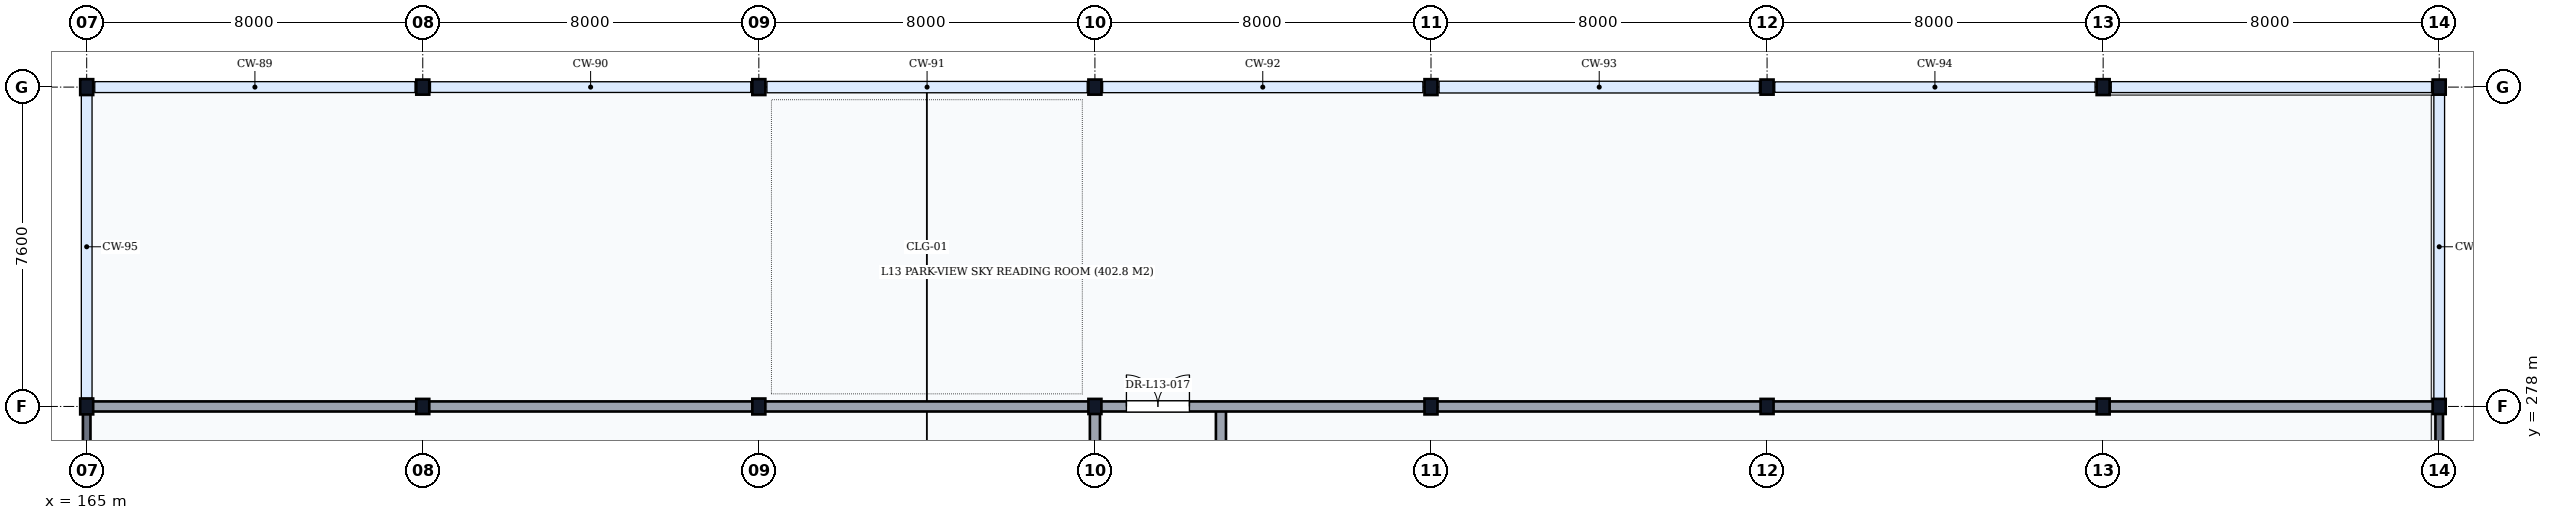
"""IFC4 building model, lengths in metres.
Left out: names, types, materials, properties, quantities, classifications, styles, units other than length and angle.
Written with IfcOpenShell. Run it as: python <this file> out.ifc"""

import sys

from ifc_helpers import new_model, si_unit, direction, frame, frame_2d, origin, origin_2d, place, context, subcontext, project, spatial, rectangle, i_section, extrude, element, fill, save


model = new_model("IFC4")
c1 = context("Model", 3, precision=1e-05, world=origin(), true_north=direction((0.0, 1.0)))
c2 = subcontext(c1, "Body", "Model", "MODEL_VIEW")
j1 = project(units=[si_unit("LENGTHUNIT", "METRE"), si_unit("PLANEANGLEUNIT", "RADIAN")], contexts=[c1])
p1 = place(None, origin())
s1 = spatial("IfcSite", under=j1, at=p1, CompositionType="ELEMENT")
p2 = place(p1, origin())
s2 = spatial("IfcBuilding", under=s1, at=p2, CompositionType="ELEMENT")
p3 = place(p2, frame((0.0, 0.0, 51.6)))
s3 = spatial("IfcBuildingStorey", under=s2, at=p3, CompositionType="ELEMENT", Elevation=51.6)
for number, where, z_axis, x_axis in (
    (1, (165.0, 278.0, 0.0), (0.0, 0.0, 1.0), (1.0, 0.0, 0.0)),
    (2, (165.0, 285.6, 0.0), (0.0, 0.0, 1.0), (1.0, 0.0, 0.0)),
):
    element("IfcColumn", number, at=place(p3, frame(where, z_axis=z_axis, x_axis=x_axis)), inside=s3, PredefinedType="COLUMN", context=c2, shape_type="SweptSolid", body=[
        extrude(i_section(OverallWidth=0.309, OverallDepth=0.377, WebThickness=0.021, FlangeThickness=0.04, FilletRadius=0.027, at=origin_2d()), origin(), (0.0, 0.0, 1.0), 4.5),
    ])
for number, where, z_axis, x_axis in (
    (3, (173.0, 278.0, 0.0), (0.0, 0.0, 1.0), (1.0, 0.0, 0.0)),
    (4, (173.0, 285.6, 0.0), (0.0, 0.0, 1.0), (1.0, 0.0, 0.0)),
):
    element("IfcColumn", number, at=place(p3, frame(where, z_axis=z_axis, x_axis=x_axis)), inside=s3, PredefinedType="COLUMN", context=c2, shape_type="SweptSolid", body=[
        extrude(i_section(OverallWidth=0.309, OverallDepth=0.359, WebThickness=0.021, FlangeThickness=0.04, FilletRadius=0.027, at=origin_2d()), origin(), (0.0, 0.0, 1.0), 4.5),
    ])
for number, where, z_axis, x_axis in (
    (5, (181.0, 278.0, 0.0), (0.0, 0.0, 1.0), (1.0, 0.0, 0.0)),
    (6, (181.0, 285.6, 0.0), (0.0, 0.0, 1.0), (1.0, 0.0, 0.0)),
):
    element("IfcColumn", number, at=place(p3, frame(where, z_axis=z_axis, x_axis=x_axis)), inside=s3, PredefinedType="COLUMN", context=c2, shape_type="SweptSolid", body=[
        extrude(i_section(OverallWidth=0.309, OverallDepth=0.377, WebThickness=0.021, FlangeThickness=0.04, FilletRadius=0.027, at=origin_2d()), origin(), (0.0, 0.0, 1.0), 4.5),
    ])
for number, where, z_axis, x_axis in (
    (7, (189.0, 278.0, 0.0), (0.0, 0.0, 1.0), (1.0, 0.0, 0.0)),
    (8, (189.0, 285.6, 0.0), (0.0, 0.0, 1.0), (1.0, 0.0, 0.0)),
):
    element("IfcColumn", number, at=place(p3, frame(where, z_axis=z_axis, x_axis=x_axis)), inside=s3, PredefinedType="COLUMN", context=c2, shape_type="SweptSolid", body=[
        extrude(i_section(OverallWidth=0.309, OverallDepth=0.359, WebThickness=0.021, FlangeThickness=0.04, FilletRadius=0.027, at=origin_2d()), origin(), (0.0, 0.0, 1.0), 4.5),
    ])
for number, where, z_axis, x_axis in (
    (9, (197.0, 278.0, 0.0), (0.0, 0.0, 1.0), (1.0, 0.0, 0.0)),
    (10, (197.0, 285.6, 0.0), (0.0, 0.0, 1.0), (1.0, 0.0, 0.0)),
):
    element("IfcColumn", number, at=place(p3, frame(where, z_axis=z_axis, x_axis=x_axis)), inside=s3, PredefinedType="COLUMN", context=c2, shape_type="SweptSolid", body=[
        extrude(i_section(OverallWidth=0.309, OverallDepth=0.377, WebThickness=0.021, FlangeThickness=0.04, FilletRadius=0.027, at=origin_2d()), origin(), (0.0, 0.0, 1.0), 4.5),
    ])
for number, where, z_axis, x_axis in (
    (11, (205.0, 278.0, 0.0), (0.0, 0.0, 1.0), (1.0, 0.0, 0.0)),
    (12, (205.0, 285.6, 0.0), (0.0, 0.0, 1.0), (1.0, 0.0, 0.0)),
):
    element("IfcColumn", number, at=place(p3, frame(where, z_axis=z_axis, x_axis=x_axis)), inside=s3, PredefinedType="COLUMN", context=c2, shape_type="SweptSolid", body=[
        extrude(i_section(OverallWidth=0.309, OverallDepth=0.359, WebThickness=0.021, FlangeThickness=0.04, FilletRadius=0.027, at=origin_2d()), origin(), (0.0, 0.0, 1.0), 4.5),
    ])
for number, where, z_axis, x_axis in (
    (13, (213.0, 278.0, 0.0), (0.0, 0.0, 1.0), (1.0, 0.0, 0.0)),
    (14, (213.0, 285.6, 0.0), (0.0, 0.0, 1.0), (1.0, 0.0, 0.0)),
):
    element("IfcColumn", number, at=place(p3, frame(where, z_axis=z_axis, x_axis=x_axis)), inside=s3, PredefinedType="COLUMN", context=c2, shape_type="SweptSolid", body=[
        extrude(i_section(OverallWidth=0.309, OverallDepth=0.377, WebThickness=0.021, FlangeThickness=0.04, FilletRadius=0.027, at=origin_2d()), origin(), (0.0, 0.0, 1.0), 4.5),
    ])
for number, where, z_axis, x_axis in (
    (15, (221.0, 278.0, 0.0), (0.0, 0.0, 1.0), (1.0, 0.0, 0.0)),
    (16, (221.0, 285.6, 0.0), (0.0, 0.0, 1.0), (1.0, 0.0, 0.0)),
):
    element("IfcColumn", number, at=place(p3, frame(where, z_axis=z_axis, x_axis=x_axis)), inside=s3, PredefinedType="COLUMN", context=c2, shape_type="SweptSolid", body=[
        extrude(i_section(OverallWidth=0.309, OverallDepth=0.359, WebThickness=0.021, FlangeThickness=0.04, FilletRadius=0.027, at=origin_2d()), origin(), (0.0, 0.0, 1.0), 4.5),
    ])
p4 = place(p3, frame((165.0, 270.406, 0.0), z_axis=(0.0, 0.0, 1.0), x_axis=(0.0, 1.0, 0.0)))
e17 = element("IfcWall", 17, at=p4, inside=s3, PredefinedType="SOLIDWALL", context=c2, shape_type="SweptSolid", body=[
    extrude(rectangle(XDim=7.588, YDim=0.18, at=frame_2d((3.794, 0.0))), origin(), (0.0, 0.0, 1.0), 3.908),
])
p5 = place(p4, frame((2.694, 0.0, 0.95)))
e18 = element("IfcOpeningElement", 18, at=p5, cuts=e17, PredefinedType="OPENING", context=c2, shape_type="SweptSolid", body=[
    extrude(rectangle(XDim=2.2, YDim=2.1, at=frame_2d((1.1, 1.05))), frame((0.0, 0.105, 0.0), z_axis=(0.0, -1.0, 0.0), x_axis=(1.0, 0.0, 0.0)), (0.0, 0.0, 1.0), 0.21),
])
p6 = place(p3, frame((221.0, 270.406, 0.0), z_axis=(0.0, 0.0, 1.0), x_axis=(0.0, 1.0, 0.0)))
e19 = element("IfcWall", 19, at=p6, inside=s3, PredefinedType="SOLIDWALL", context=c2, shape_type="SweptSolid", body=[
    extrude(rectangle(XDim=7.588, YDim=0.18, at=frame_2d((3.794, 0.0))), origin(), (0.0, 0.0, 1.0), 3.978),
])
p7 = place(p6, frame((2.694, 0.0, 0.95)))
e20 = element("IfcOpeningElement", 20, at=p7, cuts=e19, PredefinedType="OPENING", context=c2, shape_type="SweptSolid", body=[
    extrude(rectangle(XDim=2.2, YDim=2.1, at=frame_2d((1.1, 1.05))), frame((0.0, 0.105, 0.0), z_axis=(0.0, -1.0, 0.0), x_axis=(1.0, 0.0, 0.0)), (0.0, 0.0, 1.0), 0.21),
])
p8 = place(p3, frame((213.1, 285.5, 4.5), z_axis=(0.0, 0.0, 1.0), x_axis=(1.0, 0.0, 0.0)))
e21 = element("IfcWall", 21, at=p8, inside=s3, PredefinedType="PARAPET", context=c2, shape_type="SweptSolid", body=[
    extrude(rectangle(XDim=7.8, YDim=0.18, at=frame_2d((3.9, 0.0))), origin(), (0.0, 0.0, 1.0), 1.2),
])
p9 = place(p3, frame((220.9, 248.6, 4.5), z_axis=(0.0, 0.0, 1.0), x_axis=(0.0, 1.0, 0.0)))
e22 = element("IfcWall", 22, at=p9, inside=s3, PredefinedType="PARAPET", context=c2, shape_type="SweptSolid", body=[
    extrude(rectangle(XDim=36.8, YDim=0.18, at=frame_2d((18.4, 0.0))), origin(), (0.0, 0.0, 1.0), 1.2),
])
p10 = place(p3, frame((189.0, 258.2, 0.0), z_axis=(0.0, 0.0, 1.0), x_axis=(0.0, 1.0, 0.0)))
e23 = element("IfcWall", 23, at=p10, inside=s3, PredefinedType="PARTITIONING", context=c2, shape_type="SweptSolid", body=[
    extrude(rectangle(XDim=19.8, YDim=0.24, at=frame_2d((9.9, 0.0))), origin(), (0.0, 0.0, 1.0), 3.778),
])
p11 = place(p10, frame((14.25, 0.0, 0.0)))
e24 = element("IfcOpeningElement", 24, at=p11, cuts=e23, PredefinedType="OPENING", context=c2, shape_type="SweptSolid", body=[
    extrude(rectangle(XDim=1.5, YDim=2.1, at=frame_2d((0.75, 1.05))), frame((0.0, 0.135, 0.0), z_axis=(0.0, -1.0, 0.0), x_axis=(1.0, 0.0, 0.0)), (0.0, 0.0, 1.0), 0.27),
])
p12 = place(p3, frame((192.0, 258.2, 0.0), z_axis=(0.0, 0.0, 1.0), x_axis=(0.0, 1.0, 0.0)))
e25 = element("IfcWall", 25, at=p12, inside=s3, PredefinedType="PARTITIONING", context=c2, shape_type="SweptSolid", body=[
    extrude(rectangle(XDim=19.8, YDim=0.24, at=frame_2d((9.9, 0.0))), origin(), (0.0, 0.0, 1.0), 4.18),
])
p13 = place(p12, frame((14.25, 0.0, 0.0)))
e26 = element("IfcOpeningElement", 26, at=p13, cuts=e25, PredefinedType="OPENING", context=c2, shape_type="SweptSolid", body=[
    extrude(rectangle(XDim=1.5, YDim=2.1, at=frame_2d((0.75, 1.05))), frame((0.0, 0.135, 0.0), z_axis=(0.0, -1.0, 0.0), x_axis=(1.0, 0.0, 0.0)), (0.0, 0.0, 1.0), 0.27),
])
p14 = place(p3, frame((165.0, 278.0, 0.0), z_axis=(0.0, 0.0, 1.0), x_axis=(1.0, 0.0, 0.0)))
e27 = element("IfcWall", 27, at=p14, inside=s3, PredefinedType="PARTITIONING", context=c2, shape_type="SweptSolid", body=[
    extrude(rectangle(XDim=56.0, YDim=0.24, at=frame_2d((28.0, 0.0))), origin(), (0.0, 0.0, 1.0), 3.678),
])
p15 = place(p14, frame((24.75, 0.0, 0.0)))
e28 = element("IfcOpeningElement", 28, at=p15, cuts=e27, PredefinedType="OPENING", context=c2, shape_type="SweptSolid", body=[
    extrude(rectangle(XDim=1.5, YDim=2.25, at=frame_2d((0.75, 1.125))), frame((0.0, 0.135, 0.0), z_axis=(0.0, -1.0, 0.0), x_axis=(1.0, 0.0, 0.0)), (0.0, 0.0, 1.0), 0.27),
])
p16 = place(p15, origin())
e29 = element("IfcDoor", 29, at=p16, inside=s3, OperationType="DOUBLE_DOOR_SINGLE_SWING", PredefinedType="DOOR", context=c2, shape_type="SweptSolid", body=[
    extrude(rectangle(XDim=1.5, YDim=2.25, at=frame_2d((0.75, 1.125))), frame((0.0, 0.025, 0.0), z_axis=(0.0, -1.0, 0.0), x_axis=(1.0, 0.0, 0.0)), (0.0, 0.0, 1.0), 0.05),
])
fill(e28, e29)
save(model, sys.argv[1])
